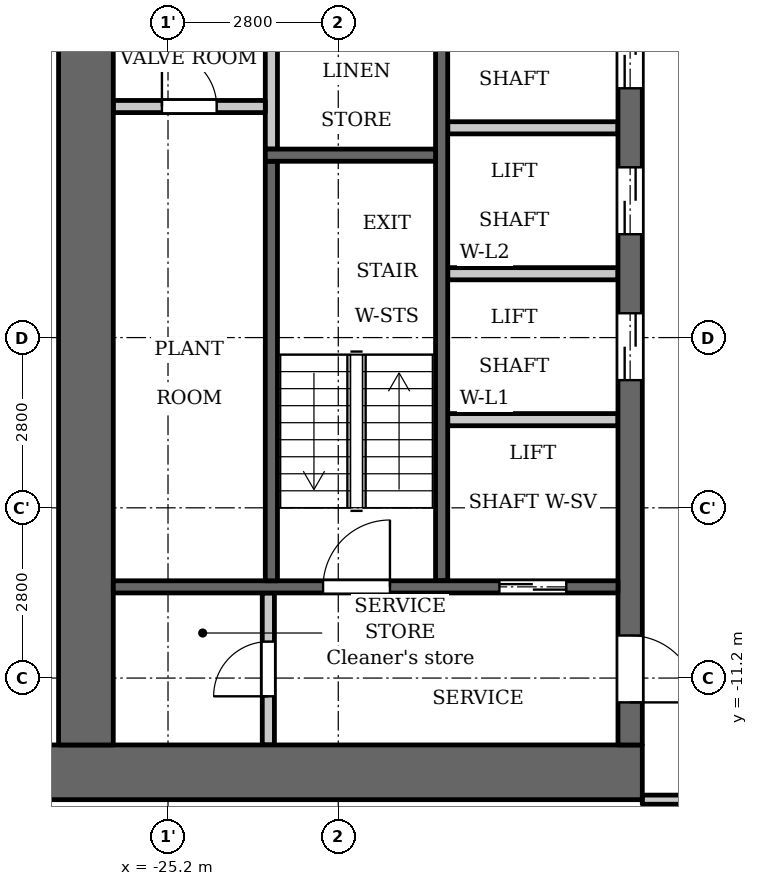
"""IFC4 building model, lengths in metres.
Left out: names, types, materials, properties, quantities, classifications, styles, units other than length and angle.
Written with IfcOpenShell. Run it as: python <this file> out.ifc"""

import sys

from ifc_helpers import new_model, si_unit, direction, frame, frame_2d, origin, place, context, subcontext, project, spatial, rectangle, extrude, element, fill, save


model = new_model("IFC4")
c1 = context("Model", 3, precision=1e-05, world=origin(), true_north=direction((0.0, 1.0)))
c2 = subcontext(c1, "Body", "Model", "MODEL_VIEW")
j1 = project(units=[si_unit("LENGTHUNIT", "METRE"), si_unit("PLANEANGLEUNIT", "RADIAN")], contexts=[c1])
p1 = place(None, origin())
s1 = spatial("IfcSite", under=j1, at=p1, CompositionType="ELEMENT")
p2 = place(p1, origin())
s2 = spatial("IfcBuilding", under=s1, at=p2, CompositionType="ELEMENT")
p3 = place(p2, frame((0.0, 0.0, 34.0)))
s3 = spatial("IfcBuildingStorey", under=s2, at=p3, CompositionType="ELEMENT", Elevation=34.0)
p4 = place(p3, frame((-23.5, -2.5, 0.0), z_axis=(0.0, 0.0, 1.0), x_axis=(0.0, 1.0, 0.0)))
e1 = element("IfcWall", 1, at=p4, inside=s3, PredefinedType="PARTITIONING", context=c2, shape_type="SweptSolid", body=[
    extrude(rectangle(XDim=2.65, YDim=0.2, at=frame_2d((1.325, 0.0))), origin(), (0.0, 0.0, 1.0), 3.2),
])
p5 = place(p3, frame((-20.7, -9.6, 0.0), z_axis=(0.0, 0.0, 1.0), x_axis=(0.0, 1.0, 0.0)))
e2 = element("IfcWall", 2, at=p5, inside=s3, PredefinedType="SHEAR", context=c2, shape_type="SweptSolid", body=[
    extrude(rectangle(XDim=9.75, YDim=0.2, at=frame_2d((4.875, 0.0))), origin(), (0.0, 0.0, 1.0), 3.2),
])
p6 = place(p3, frame((-17.4, -12.75, 0.0), z_axis=(0.0, 0.0, 1.0), x_axis=(-1.0, 0.0, 0.0)))
e3 = element("IfcWall", 3, at=p6, inside=s3, PredefinedType="SHEAR", context=c2, shape_type="SweptSolid", body=[
    extrude(rectangle(XDim=10.4, YDim=0.9, at=frame_2d((5.2, 0.0))), origin(), (0.0, 0.0, 1.0), 3.2),
])
p7 = place(p3, frame((-17.6, -12.3, 0.0), z_axis=(0.0, 0.0, 1.0), x_axis=(0.0, 1.0, 0.0)))
e4 = element("IfcWall", 4, at=p7, inside=s3, PredefinedType="SHEAR", context=c2, shape_type="SweptSolid", body=[
    extrude(rectangle(XDim=24.6, YDim=0.4, at=frame_2d((12.3, 0.0))), origin(), (0.0, 0.0, 1.0), 3.2),
])
p8 = place(p7, frame((6.0, 0.0, 0.0)))
e5 = element("IfcOpeningElement", 5, at=p8, cuts=e4, PredefinedType="OPENING", context=c2, shape_type="SweptSolid", body=[
    extrude(rectangle(XDim=1.1, YDim=2.1, at=frame_2d((0.55, 1.05))), frame((0.0, 0.21, 0.0), z_axis=(0.0, -1.0, 0.0), x_axis=(1.0, 0.0, 0.0)), (0.0, 0.0, 1.0), 0.42),
])
p9 = place(p7, frame((8.4, 0.0, 0.0)))
e6 = element("IfcOpeningElement", 6, at=p9, cuts=e4, PredefinedType="OPENING", context=c2, shape_type="SweptSolid", body=[
    extrude(rectangle(XDim=1.1, YDim=2.1, at=frame_2d((0.55, 1.05))), frame((0.0, 0.21, 0.0), z_axis=(0.0, -1.0, 0.0), x_axis=(1.0, 0.0, 0.0)), (0.0, 0.0, 1.0), 0.42),
])
p10 = place(p7, frame((10.8, 0.0, 0.0)))
e7 = element("IfcOpeningElement", 7, at=p10, cuts=e4, PredefinedType="OPENING", context=c2, shape_type="SweptSolid", body=[
    extrude(rectangle(XDim=1.1, YDim=2.1, at=frame_2d((0.55, 1.05))), frame((0.0, 0.21, 0.0), z_axis=(0.0, -1.0, 0.0), x_axis=(1.0, 0.0, 0.0)), (0.0, 0.0, 1.0), 0.42),
])
p11 = place(p7, frame((16.75, 0.0, 0.0)))
e8 = element("IfcOpeningElement", 8, at=p11, cuts=e4, PredefinedType="OPENING", context=c2, shape_type="SweptSolid", body=[
    extrude(rectangle(XDim=0.9, YDim=2.1, at=frame_2d((0.45, 1.05))), frame((0.0, 0.21, 0.0), z_axis=(0.0, -1.0, 0.0), x_axis=(1.0, 0.0, 0.0)), (0.0, 0.0, 1.0), 0.42),
])
p12 = place(p7, frame((22.8, 0.0, 0.0)))
e9 = element("IfcOpeningElement", 9, at=p12, cuts=e4, PredefinedType="OPENING", context=c2, shape_type="SweptSolid", body=[
    extrude(rectangle(XDim=1.1, YDim=2.1, at=frame_2d((0.55, 1.05))), frame((0.0, 0.21, 0.0), z_axis=(0.0, -1.0, 0.0), x_axis=(1.0, 0.0, 0.0)), (0.0, 0.0, 1.0), 0.42),
])
p13 = place(p7, frame((0.7, 0.0, 0.0)))
e10 = element("IfcOpeningElement", 10, at=p13, cuts=e4, PredefinedType="OPENING", context=c2, shape_type="SweptSolid", body=[
    extrude(rectangle(XDim=1.1, YDim=2.1, at=frame_2d((0.55, 1.05))), frame((0.0, 0.21, 0.0), z_axis=(0.0, -1.0, 0.0), x_axis=(1.0, 0.0, 0.0)), (0.0, 0.0, 1.0), 0.42),
])
p14 = place(p7, frame((12.775, 0.0, 0.0)))
e11 = element("IfcOpeningElement", 11, at=p14, cuts=e4, PredefinedType="OPENING", context=c2, shape_type="SweptSolid", body=[
    extrude(rectangle(XDim=1.8, YDim=2.1, at=frame_2d((0.9, 1.05))), frame((0.0, 0.21, 0.0), z_axis=(0.0, -1.0, 0.0), x_axis=(1.0, 0.0, 0.0)), (0.0, 0.0, 1.0), 0.42),
])
p15 = place(p3, frame((-26.55, -12.3, 0.0), z_axis=(0.0, 0.0, 1.0), x_axis=(0.0, 1.0, 0.0)))
e12 = element("IfcWall", 12, at=p15, inside=s3, PredefinedType="SHEAR", context=c2, shape_type="SweptSolid", body=[
    extrude(rectangle(XDim=24.6, YDim=0.9, at=frame_2d((12.3, 0.0))), origin(), (0.0, 0.0, 1.0), 3.2),
])
p16 = place(p3, frame((-23.55, -12.3, 0.0), z_axis=(0.0, 0.0, 1.0), x_axis=(0.0, 1.0, 0.0)))
e13 = element("IfcWall", 13, at=p16, inside=s3, PredefinedType="PARTITIONING", context=c2, shape_type="SweptSolid", body=[
    extrude(rectangle(XDim=2.5, YDim=0.2, at=frame_2d((1.25, 0.0))), origin(), (0.0, 0.0, 1.0), 3.2),
])
p17 = place(p16, frame((0.8, 0.0, 0.0)))
e14 = element("IfcOpeningElement", 14, at=p17, cuts=e13, PredefinedType="OPENING", context=c2, shape_type="SweptSolid", body=[
    extrude(rectangle(XDim=0.9, YDim=2.1, at=frame_2d((0.45, 1.05))), frame((0.0, 0.11, 0.0), z_axis=(0.0, -1.0, 0.0), x_axis=(1.0, 0.0, 0.0)), (0.0, 0.0, 1.0), 0.22),
])
p18 = place(p3, frame((-23.6, -1.8, 0.0), z_axis=(0.0, 0.0, 1.0), x_axis=(-1.0, 0.0, 0.0)))
e15 = element("IfcWall", 15, at=p18, inside=s3, PredefinedType="PARTITIONING", context=c2, shape_type="SweptSolid", body=[
    extrude(rectangle(XDim=2.5, YDim=0.2, at=frame_2d((1.25, 0.0))), origin(), (0.0, 0.0, 1.0), 3.2),
])
p19 = place(p18, frame((0.8, 0.0, 0.0)))
e16 = element("IfcOpeningElement", 16, at=p19, cuts=e15, PredefinedType="OPENING", context=c2, shape_type="SweptSolid", body=[
    extrude(rectangle(XDim=0.9, YDim=2.1, at=frame_2d((0.45, 1.05))), frame((0.0, 0.11, 0.0), z_axis=(0.0, -1.0, 0.0), x_axis=(1.0, 0.0, 0.0)), (0.0, 0.0, 1.0), 0.22),
])
p20 = place(p3, frame((-17.8, -9.7, 0.0), z_axis=(0.0, 0.0, 1.0), x_axis=(-1.0, 0.0, 0.0)))
e17 = element("IfcWall", 17, at=p20, inside=s3, PredefinedType="SHEAR", context=c2, shape_type="SweptSolid", body=[
    extrude(rectangle(XDim=8.3, YDim=0.2, at=frame_2d((4.15, 0.0))), origin(), (0.0, 0.0, 1.0), 3.2),
])
p21 = place(p20, frame((0.85, 0.0, 0.0)))
e18 = element("IfcOpeningElement", 18, at=p21, cuts=e17, PredefinedType="OPENING", context=c2, shape_type="SweptSolid", body=[
    extrude(rectangle(XDim=1.1, YDim=2.1, at=frame_2d((0.55, 1.05))), frame((0.0, 0.11, 0.0), z_axis=(0.0, -1.0, 0.0), x_axis=(1.0, 0.0, 0.0)), (0.0, 0.0, 1.0), 0.22),
])
p22 = place(p20, frame((3.75, 0.0, 0.0)))
e19 = element("IfcOpeningElement", 19, at=p22, cuts=e17, PredefinedType="OPENING", context=c2, shape_type="SweptSolid", body=[
    extrude(rectangle(XDim=1.1, YDim=2.1, at=frame_2d((0.55, 1.05))), frame((0.0, 0.11, 0.0), z_axis=(0.0, -1.0, 0.0), x_axis=(1.0, 0.0, 0.0)), (0.0, 0.0, 1.0), 0.22),
])
for number, where, z_axis, x_axis in (
    (20, (-17.8, -6.95, 0.0), (0.0, 0.0, 1.0), (-1.0, 0.0, 0.0)),
    (21, (-17.8, -4.55, 0.0), (0.0, 0.0, 1.0), (-1.0, 0.0, 0.0)),
    (22, (-17.8, -2.15, 0.0), (0.0, 0.0, 1.0), (-1.0, 0.0, 0.0)),
):
    element("IfcWall", number, at=place(p3, frame(where, z_axis=z_axis, x_axis=x_axis)), inside=s3, PredefinedType="PARTITIONING", context=c2, shape_type="SweptSolid", body=[
        extrude(rectangle(XDim=2.8, YDim=0.2, at=frame_2d((1.4, 0.0))), origin(), (0.0, 0.0, 1.0), 3.2),
    ])
p23 = place(p3, frame((-23.5, -9.6, 0.0), z_axis=(0.0, 0.0, 1.0), x_axis=(0.0, 1.0, 0.0)))
e23 = element("IfcWall", 23, at=p23, inside=s3, PredefinedType="SHEAR", context=c2, shape_type="SweptSolid", body=[
    extrude(rectangle(XDim=6.9, YDim=0.2, at=frame_2d((3.45, 0.0))), origin(), (0.0, 0.0, 1.0), 3.2),
])
p24 = place(p3, frame((-20.8, -2.6, 0.0), z_axis=(0.0, 0.0, 1.0), x_axis=(-1.0, 0.0, 0.0)))
e24 = element("IfcWall", 24, at=p24, inside=s3, PredefinedType="SHEAR", context=c2, shape_type="SweptSolid", body=[
    extrude(rectangle(XDim=2.8, YDim=0.2, at=frame_2d((1.4, 0.0))), origin(), (0.0, 0.0, 1.0), 3.2),
])
p25 = place(p3, frame((-17.4, -13.2, 0.0), z_axis=(0.0, 0.0, 1.0), x_axis=(1.0, 0.0, 0.0)))
e25 = element("IfcWall", 25, at=p25, inside=s3, PredefinedType="PARTITIONING", context=c2, shape_type="SweptSolid", body=[
    extrude(rectangle(XDim=34.8, YDim=0.15, at=frame_2d((17.4, 0.0))), origin(), (0.0, 0.0, 1.0), 3.2),
])
p26 = place(p25, frame((0.65, 0.0, 0.0)))
e26 = element("IfcOpeningElement", 26, at=p26, cuts=e25, PredefinedType="OPENING", context=c2, shape_type="SweptSolid", body=[
    extrude(rectangle(XDim=1.0, YDim=2.1, at=frame_2d((0.5, 1.05))), frame((0.0, 0.085, 0.0), z_axis=(0.0, -1.0, 0.0), x_axis=(1.0, 0.0, 0.0)), (0.0, 0.0, 1.0), 0.17),
])
p27 = place(p25, frame((33.05, 0.0, 0.0)))
e27 = element("IfcOpeningElement", 27, at=p27, cuts=e25, PredefinedType="OPENING", context=c2, shape_type="SweptSolid", body=[
    extrude(rectangle(XDim=1.0, YDim=2.1, at=frame_2d((0.5, 1.05))), frame((0.0, 0.085, 0.0), z_axis=(0.0, -1.0, 0.0), x_axis=(1.0, 0.0, 0.0)), (0.0, 0.0, 1.0), 0.17),
])
p28 = place(p25, frame((4.55, 0.0, 0.0)))
e28 = element("IfcOpeningElement", 28, at=p28, cuts=e25, PredefinedType="OPENING", context=c2, shape_type="SweptSolid", body=[
    extrude(rectangle(XDim=1.0, YDim=2.1, at=frame_2d((0.5, 1.05))), frame((0.0, 0.085, 0.0), z_axis=(0.0, -1.0, 0.0), x_axis=(1.0, 0.0, 0.0)), (0.0, 0.0, 1.0), 0.17),
])
p29 = place(p25, frame((6.9, 0.0, 0.0)))
e29 = element("IfcOpeningElement", 29, at=p29, cuts=e25, PredefinedType="OPENING", context=c2, shape_type="SweptSolid", body=[
    extrude(rectangle(XDim=1.0, YDim=2.1, at=frame_2d((0.5, 1.05))), frame((0.0, 0.085, 0.0), z_axis=(0.0, -1.0, 0.0), x_axis=(1.0, 0.0, 0.0)), (0.0, 0.0, 1.0), 0.17),
])
p30 = place(p25, frame((15.75, 0.0, 0.0)))
e30 = element("IfcOpeningElement", 30, at=p30, cuts=e25, PredefinedType="OPENING", context=c2, shape_type="SweptSolid", body=[
    extrude(rectangle(XDim=1.0, YDim=2.1, at=frame_2d((0.5, 1.05))), frame((0.0, 0.085, 0.0), z_axis=(0.0, -1.0, 0.0), x_axis=(1.0, 0.0, 0.0)), (0.0, 0.0, 1.0), 0.17),
])
p31 = place(p25, frame((18.1, 0.0, 0.0)))
e31 = element("IfcOpeningElement", 31, at=p31, cuts=e25, PredefinedType="OPENING", context=c2, shape_type="SweptSolid", body=[
    extrude(rectangle(XDim=1.0, YDim=2.1, at=frame_2d((0.5, 1.05))), frame((0.0, 0.085, 0.0), z_axis=(0.0, -1.0, 0.0), x_axis=(1.0, 0.0, 0.0)), (0.0, 0.0, 1.0), 0.17),
])
p32 = place(p25, frame((26.95, 0.0, 0.0)))
e32 = element("IfcOpeningElement", 32, at=p32, cuts=e25, PredefinedType="OPENING", context=c2, shape_type="SweptSolid", body=[
    extrude(rectangle(XDim=1.0, YDim=2.1, at=frame_2d((0.5, 1.05))), frame((0.0, 0.085, 0.0), z_axis=(0.0, -1.0, 0.0), x_axis=(1.0, 0.0, 0.0)), (0.0, 0.0, 1.0), 0.17),
])
p33 = place(p25, frame((29.25, 0.0, 0.0)))
e33 = element("IfcOpeningElement", 33, at=p33, cuts=e25, PredefinedType="OPENING", context=c2, shape_type="SweptSolid", body=[
    extrude(rectangle(XDim=1.0, YDim=2.1, at=frame_2d((0.5, 1.05))), frame((0.0, 0.085, 0.0), z_axis=(0.0, -1.0, 0.0), x_axis=(1.0, 0.0, 0.0)), (0.0, 0.0, 1.0), 0.17),
])
p34 = place(p21, origin())
e34 = element("IfcDoor", 34, at=p34, inside=s3, OperationType="DOUBLE_DOOR_SLIDING", PredefinedType="DOOR", context=c2, shape_type="SweptSolid", body=[
    extrude(rectangle(XDim=1.1, YDim=2.1, at=frame_2d((0.55, 1.05))), frame((0.0, 0.025, 0.0), z_axis=(0.0, -1.0, 0.0), x_axis=(1.0, 0.0, 0.0)), (0.0, 0.0, 1.0), 0.05),
])
fill(e18, e34)
p35 = place(p8, origin())
e35 = element("IfcDoor", 35, at=p35, inside=s3, OperationType="DOUBLE_DOOR_SLIDING", PredefinedType="DOOR", context=c2, shape_type="SweptSolid", body=[
    extrude(rectangle(XDim=1.1, YDim=2.1, at=frame_2d((0.55, 1.05))), frame((0.0, 0.025, 0.0), z_axis=(0.0, -1.0, 0.0), x_axis=(1.0, 0.0, 0.0)), (0.0, 0.0, 1.0), 0.05),
])
fill(e5, e35)
p36 = place(p9, origin())
e36 = element("IfcDoor", 36, at=p36, inside=s3, OperationType="DOUBLE_DOOR_SLIDING", PredefinedType="DOOR", context=c2, shape_type="SweptSolid", body=[
    extrude(rectangle(XDim=1.1, YDim=2.1, at=frame_2d((0.55, 1.05))), frame((0.0, 0.025, 0.0), z_axis=(0.0, -1.0, 0.0), x_axis=(1.0, 0.0, 0.0)), (0.0, 0.0, 1.0), 0.05),
])
fill(e6, e36)
p37 = place(p10, origin())
e37 = element("IfcDoor", 37, at=p37, inside=s3, OperationType="DOUBLE_DOOR_SLIDING", PredefinedType="DOOR", context=c2, shape_type="SweptSolid", body=[
    extrude(rectangle(XDim=1.1, YDim=2.1, at=frame_2d((0.55, 1.05))), frame((0.0, 0.025, 0.0), z_axis=(0.0, -1.0, 0.0), x_axis=(1.0, 0.0, 0.0)), (0.0, 0.0, 1.0), 0.05),
])
fill(e7, e37)
p38 = place(p13, origin())
e38 = element("IfcDoor", 38, at=p38, inside=s3, OperationType="SINGLE_SWING_LEFT", PredefinedType="DOOR", context=c2, shape_type="SweptSolid", body=[
    extrude(rectangle(XDim=1.1, YDim=2.1, at=frame_2d((0.55, 1.05))), frame((0.0, 0.025, 0.0), z_axis=(0.0, -1.0, 0.0), x_axis=(1.0, 0.0, 0.0)), (0.0, 0.0, 1.0), 0.05),
])
fill(e10, e38)
p39 = place(p17, origin())
e39 = element("IfcDoor", 39, at=p39, inside=s3, OperationType="SINGLE_SWING_RIGHT", PredefinedType="DOOR", context=c2, shape_type="SweptSolid", body=[
    extrude(rectangle(XDim=0.9, YDim=2.1, at=frame_2d((0.45, 1.05))), frame((0.0, 0.025, 0.0), z_axis=(0.0, -1.0, 0.0), x_axis=(1.0, 0.0, 0.0)), (0.0, 0.0, 1.0), 0.05),
])
fill(e14, e39)
p40 = place(p22, origin())
e40 = element("IfcDoor", 40, at=p40, inside=s3, OperationType="SINGLE_SWING_LEFT", PredefinedType="DOOR", context=c2, shape_type="SweptSolid", body=[
    extrude(rectangle(XDim=1.1, YDim=2.1, at=frame_2d((0.55, 1.05))), frame((0.0, 0.025, 0.0), z_axis=(0.0, -1.0, 0.0), x_axis=(1.0, 0.0, 0.0)), (0.0, 0.0, 1.0), 0.05),
])
fill(e19, e40)
p41 = place(p19, origin())
e41 = element("IfcDoor", 41, at=p41, inside=s3, OperationType="SINGLE_SWING_RIGHT", PredefinedType="DOOR", context=c2, shape_type="SweptSolid", body=[
    extrude(rectangle(XDim=0.9, YDim=2.1, at=frame_2d((0.45, 1.05))), frame((0.0, 0.025, 0.0), z_axis=(0.0, -1.0, 0.0), x_axis=(1.0, 0.0, 0.0)), (0.0, 0.0, 1.0), 0.05),
])
fill(e16, e41)
save(model, sys.argv[1])
